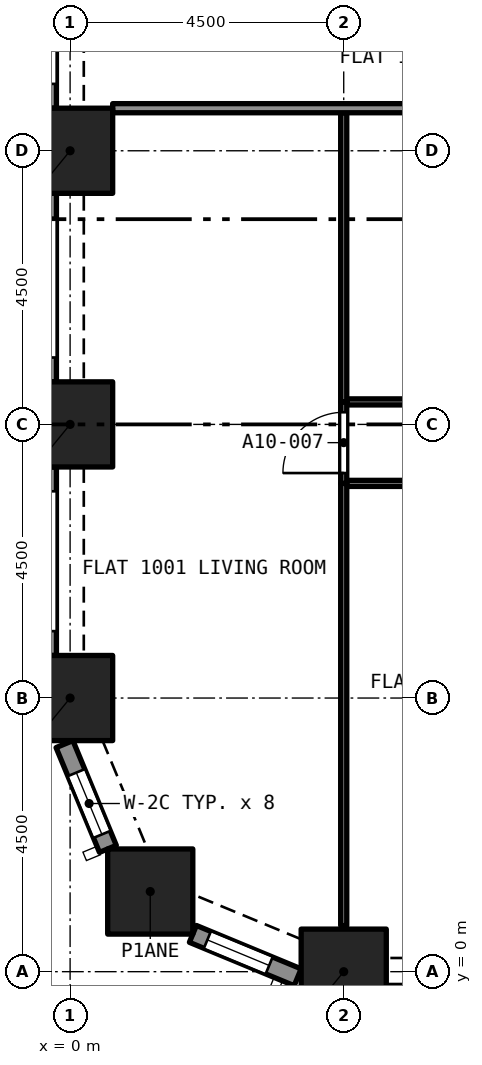
"""IFC4 building model, lengths in metres.
Left out: names, types, materials, properties, quantities, classifications, styles, units other than length and angle.
Written with IfcOpenShell. Run it as: python <this file> out.ifc"""

import sys

from ifc_helpers import new_model, si_unit, direction, frame, frame_2d, origin, origin_2d, place, context, subcontext, project, spatial, rectangle, extrude, element, fill, save


model = new_model("IFC4")
c1 = context("Model", 3, precision=1e-05, world=origin(), true_north=direction((0.0, 1.0)))
c2 = subcontext(c1, "Body", "Model", "MODEL_VIEW")
j1 = project(units=[si_unit("LENGTHUNIT", "METRE"), si_unit("PLANEANGLEUNIT", "RADIAN")], contexts=[c1])
p1 = place(None, origin())
s1 = spatial("IfcSite", under=j1, at=p1, CompositionType="ELEMENT")
p2 = place(p1, origin())
s2 = spatial("IfcBuilding", under=s1, at=p2, CompositionType="ELEMENT")
p3 = place(p2, frame((0.0, 0.0, 43.2)))
s3 = spatial("IfcBuildingStorey", under=s2, at=p3, CompositionType="ELEMENT", Elevation=43.2)
for number, where, z_axis, x_axis in (
    (1, (4.5, 0.0, 0.0), (0.0, 0.0, 1.0), (1.0, 0.0, 0.0)),
    (2, (1.318, 1.318, 0.0), (0.0, 0.0, 1.0), (1.0, 0.0, 0.0)),
    (3, (0.0, 4.5, 0.0), (0.0, 0.0, 1.0), (1.0, 0.0, 0.0)),
    (4, (0.0, 9.0, 0.0), (0.0, 0.0, 1.0), (1.0, 0.0, 0.0)),
    (5, (0.0, 13.5, 0.0), (0.0, 0.0, 1.0), (1.0, 0.0, 0.0)),
):
    element("IfcColumn", number, at=place(p3, frame(where, z_axis=z_axis, x_axis=x_axis)), inside=s3, PredefinedType="COLUMN", context=c2, shape_type="SweptSolid", body=[
        extrude(rectangle(XDim=1.4, YDim=1.4, at=origin_2d()), origin(), (0.0, 0.0, 1.0), 3.2),
    ])
p4 = place(p3, frame((0.622, 2.02, 0.0), z_axis=(0.0, 0.0, 1.0), x_axis=(-0.38262540684, 0.923903565336, 0.0)))
e6 = element("IfcWall", 6, at=p4, inside=s3, PredefinedType="SOLIDWALL", context=c2, shape_type="SweptSolid", body=[
    extrude(rectangle(XDim=1.865, YDim=0.3, at=frame_2d((0.933, 0.0))), origin(), (0.0, 0.0, 1.0), 3.2),
])
p5 = place(p4, frame((0.258, 0.0, 0.45)))
e7 = element("IfcOpeningElement", 7, at=p5, cuts=e6, PredefinedType="OPENING", context=c2, shape_type="SweptSolid", body=[
    extrude(rectangle(XDim=1.1, YDim=1.95, at=frame_2d((0.55, 0.975))), frame((0.0, 0.16, 0.0), z_axis=(0.0, -1.0, 0.0), x_axis=(1.0, 0.0, 0.0)), (0.0, 0.0, 1.0), 0.32),
])
p6 = place(p3, frame((3.743, -0.092, 0.0), z_axis=(0.0, 0.0, 1.0), x_axis=(-0.923857286003, 0.382737135771, 0.0)))
e8 = element("IfcWall", 8, at=p6, inside=s3, PredefinedType="SOLIDWALL", context=c2, shape_type="SweptSolid", body=[
    extrude(rectangle(XDim=1.865, YDim=0.3, at=frame_2d((0.933, 0.0))), origin(), (0.0, 0.0, 1.0), 3.2),
])
p7 = place(p6, frame((0.508, 0.0, 0.45)))
e9 = element("IfcOpeningElement", 9, at=p7, cuts=e8, PredefinedType="OPENING", context=c2, shape_type="SweptSolid", body=[
    extrude(rectangle(XDim=1.1, YDim=1.95, at=frame_2d((0.55, 0.975))), frame((0.0, 0.16, 0.0), z_axis=(0.0, -1.0, 0.0), x_axis=(1.0, 0.0, 0.0)), (0.0, 0.0, 1.0), 0.32),
])
p8 = place(p3, frame((-0.375, 14.2, 0.0), z_axis=(0.0, 0.0, 1.0), x_axis=(0.0, 1.0, 0.0)))
e10 = element("IfcWall", 10, at=p8, inside=s3, PredefinedType="SOLIDWALL", context=c2, shape_type="SweptSolid", body=[
    extrude(rectangle(XDim=3.1, YDim=0.3, at=frame_2d((1.55, 0.0))), origin(), (0.0, 0.0, 1.0), 3.2),
])
p9 = place(p8, frame((0.4, 0.0, 0.45)))
e11 = element("IfcOpeningElement", 11, at=p9, cuts=e10, PredefinedType="OPENING", context=c2, shape_type="SweptSolid", body=[
    extrude(rectangle(XDim=2.3, YDim=1.95, at=frame_2d((1.15, 0.975))), frame((0.0, 0.16, 0.0), z_axis=(0.0, -1.0, 0.0), x_axis=(1.0, 0.0, 0.0)), (0.0, 0.0, 1.0), 0.32),
])
p10 = place(p3, frame((-0.375, 9.7, 0.0), z_axis=(0.0, 0.0, 1.0), x_axis=(0.0, 1.0, 0.0)))
e12 = element("IfcWall", 12, at=p10, inside=s3, PredefinedType="SOLIDWALL", context=c2, shape_type="SweptSolid", body=[
    extrude(rectangle(XDim=3.1, YDim=0.3, at=frame_2d((1.55, 0.0))), origin(), (0.0, 0.0, 1.0), 3.2),
])
p11 = place(p10, frame((0.4, 0.0, 0.45)))
e13 = element("IfcOpeningElement", 13, at=p11, cuts=e12, PredefinedType="OPENING", context=c2, shape_type="SweptSolid", body=[
    extrude(rectangle(XDim=2.3, YDim=1.95, at=frame_2d((1.15, 0.975))), frame((0.0, 0.16, 0.0), z_axis=(0.0, -1.0, 0.0), x_axis=(1.0, 0.0, 0.0)), (0.0, 0.0, 1.0), 0.32),
])
p12 = place(p3, frame((-0.375, 5.2, 0.0), z_axis=(0.0, 0.0, 1.0), x_axis=(0.0, 1.0, 0.0)))
e14 = element("IfcWall", 14, at=p12, inside=s3, PredefinedType="SOLIDWALL", context=c2, shape_type="SweptSolid", body=[
    extrude(rectangle(XDim=3.1, YDim=0.3, at=frame_2d((1.55, 0.0))), origin(), (0.0, 0.0, 1.0), 3.2),
])
p13 = place(p12, frame((0.4, 0.0, 0.45)))
e15 = element("IfcOpeningElement", 15, at=p13, cuts=e14, PredefinedType="OPENING", context=c2, shape_type="SweptSolid", body=[
    extrude(rectangle(XDim=2.3, YDim=1.95, at=frame_2d((1.15, 0.975))), frame((0.0, 0.16, 0.0), z_axis=(0.0, -1.0, 0.0), x_axis=(1.0, 0.0, 0.0)), (0.0, 0.0, 1.0), 0.32),
])
p14 = place(p3, frame((9.0, 8.03, 0.0), z_axis=(0.0, 0.0, 1.0), x_axis=(-1.0, 0.0, 0.0)))
e16 = element("IfcWall", 16, at=p14, inside=s3, PredefinedType="PARTITIONING", context=c2, shape_type="SweptSolid", body=[
    extrude(rectangle(XDim=4.45, YDim=0.1, at=frame_2d((2.225, 0.0))), origin(), (0.0, 0.0, 1.0), 2.9),
])
p15 = place(p14, frame((1.8, 0.0, 0.0)))
e17 = element("IfcOpeningElement", 17, at=p15, cuts=e16, PredefinedType="OPENING", context=c2, shape_type="SweptSolid", body=[
    extrude(rectangle(XDim=0.9, YDim=2.1, at=frame_2d((0.45, 1.05))), frame((0.0, 0.06, 0.0), z_axis=(0.0, -1.0, 0.0), x_axis=(1.0, 0.0, 0.0)), (0.0, 0.0, 1.0), 0.12),
])
p16 = place(p3, frame((4.5, 0.758, 0.0), z_axis=(0.0, 0.0, 1.0), x_axis=(0.0, 1.0, 0.0)))
e18 = element("IfcWall", 18, at=p16, inside=s3, PredefinedType="PARTITIONING", context=c2, shape_type="SweptSolid", body=[
    extrude(rectangle(XDim=7.272, YDim=0.1, at=frame_2d((3.636, 0.0))), origin(), (0.0, 0.0, 1.0), 2.9),
])
p17 = place(p3, frame((4.55, 9.37, 0.0), z_axis=(0.0, 0.0, 1.0), x_axis=(1.0, 0.0, 0.0)))
e19 = element("IfcWall", 19, at=p17, inside=s3, PredefinedType="PARTITIONING", context=c2, shape_type="SweptSolid", body=[
    extrude(rectangle(XDim=3.057, YDim=0.1, at=frame_2d((1.528, 0.0))), origin(), (0.0, 0.0, 1.0), 2.9),
])
p18 = place(p17, frame((1.053, 0.0, 0.0)))
e20 = element("IfcOpeningElement", 20, at=p18, cuts=e19, PredefinedType="OPENING", context=c2, shape_type="SweptSolid", body=[
    extrude(rectangle(XDim=0.9, YDim=2.1, at=frame_2d((0.45, 1.05))), frame((0.0, 0.06, 0.0), z_axis=(0.0, -1.0, 0.0), x_axis=(1.0, 0.0, 0.0)), (0.0, 0.0, 1.0), 0.12),
])
p19 = place(p3, frame((4.5, 8.03, 0.0), z_axis=(0.0, 0.0, 1.0), x_axis=(0.0, 1.0, 0.0)))
e21 = element("IfcWall", 21, at=p19, inside=s3, PredefinedType="PARTITIONING", context=c2, shape_type="SweptSolid", body=[
    extrude(rectangle(XDim=1.34, YDim=0.1, at=frame_2d((0.67, 0.0))), origin(), (0.0, 0.0, 1.0), 2.9),
])
p20 = place(p19, frame((0.17, 0.0, 0.0)))
e22 = element("IfcOpeningElement", 22, at=p20, cuts=e21, PredefinedType="OPENING", context=c2, shape_type="SweptSolid", body=[
    extrude(rectangle(XDim=1.0, YDim=2.1, at=frame_2d((0.5, 1.05))), frame((0.0, 0.06, 0.0), z_axis=(0.0, -1.0, 0.0), x_axis=(1.0, 0.0, 0.0)), (0.0, 0.0, 1.0), 0.12),
])
p21 = place(p3, frame((4.5, 9.37, 0.0), z_axis=(0.0, 0.0, 1.0), x_axis=(0.0, 1.0, 0.0)))
e23 = element("IfcWall", 23, at=p21, inside=s3, PredefinedType="PARTITIONING", context=c2, shape_type="SweptSolid", body=[
    extrude(rectangle(XDim=4.755, YDim=0.1, at=frame_2d((2.377, 0.0))), origin(), (0.0, 0.0, 1.0), 2.9),
])
p22 = place(p3, frame((0.7, 14.2, 0.0), z_axis=(0.0, 0.0, 1.0), x_axis=(1.0, 0.0, 0.0)))
e24 = element("IfcWall", 24, at=p22, inside=s3, PredefinedType="PARTITIONING", context=c2, shape_type="SweptSolid", body=[
    extrude(rectangle(XDim=13.175, YDim=0.15, at=frame_2d((6.587, 0.0))), origin(), (0.0, 0.0, 1.0), 2.9),
])
p23 = place(p5, origin())
e25 = element("IfcWindow", 25, at=p23, inside=s3, PartitioningType="SINGLE_PANEL", PredefinedType="WINDOW", context=c2, shape_type="SweptSolid", body=[
    extrude(rectangle(XDim=1.1, YDim=1.95, at=frame_2d((0.55, 0.975))), frame((0.0, 0.03, 0.0), z_axis=(0.0, -1.0, 0.0), x_axis=(1.0, 0.0, 0.0)), (0.0, 0.0, 1.0), 0.06),
])
fill(e7, e25)
p24 = place(p7, origin())
e26 = element("IfcWindow", 26, at=p24, inside=s3, PartitioningType="SINGLE_PANEL", PredefinedType="WINDOW", context=c2, shape_type="SweptSolid", body=[
    extrude(rectangle(XDim=1.1, YDim=1.95, at=frame_2d((0.55, 0.975))), frame((0.0, 0.03, 0.0), z_axis=(0.0, -1.0, 0.0), x_axis=(1.0, 0.0, 0.0)), (0.0, 0.0, 1.0), 0.06),
])
fill(e9, e26)
p25 = place(p20, origin())
e27 = element("IfcDoor", 27, at=p25, inside=s3, OperationType="SINGLE_SWING_RIGHT", PredefinedType="DOOR", context=c2, shape_type="SweptSolid", body=[
    extrude(rectangle(XDim=1.0, YDim=2.1, at=frame_2d((0.5, 1.05))), frame((0.0, 0.025, 0.0), z_axis=(0.0, -1.0, 0.0), x_axis=(1.0, 0.0, 0.0)), (0.0, 0.0, 1.0), 0.05),
])
fill(e22, e27)
save(model, sys.argv[1])
